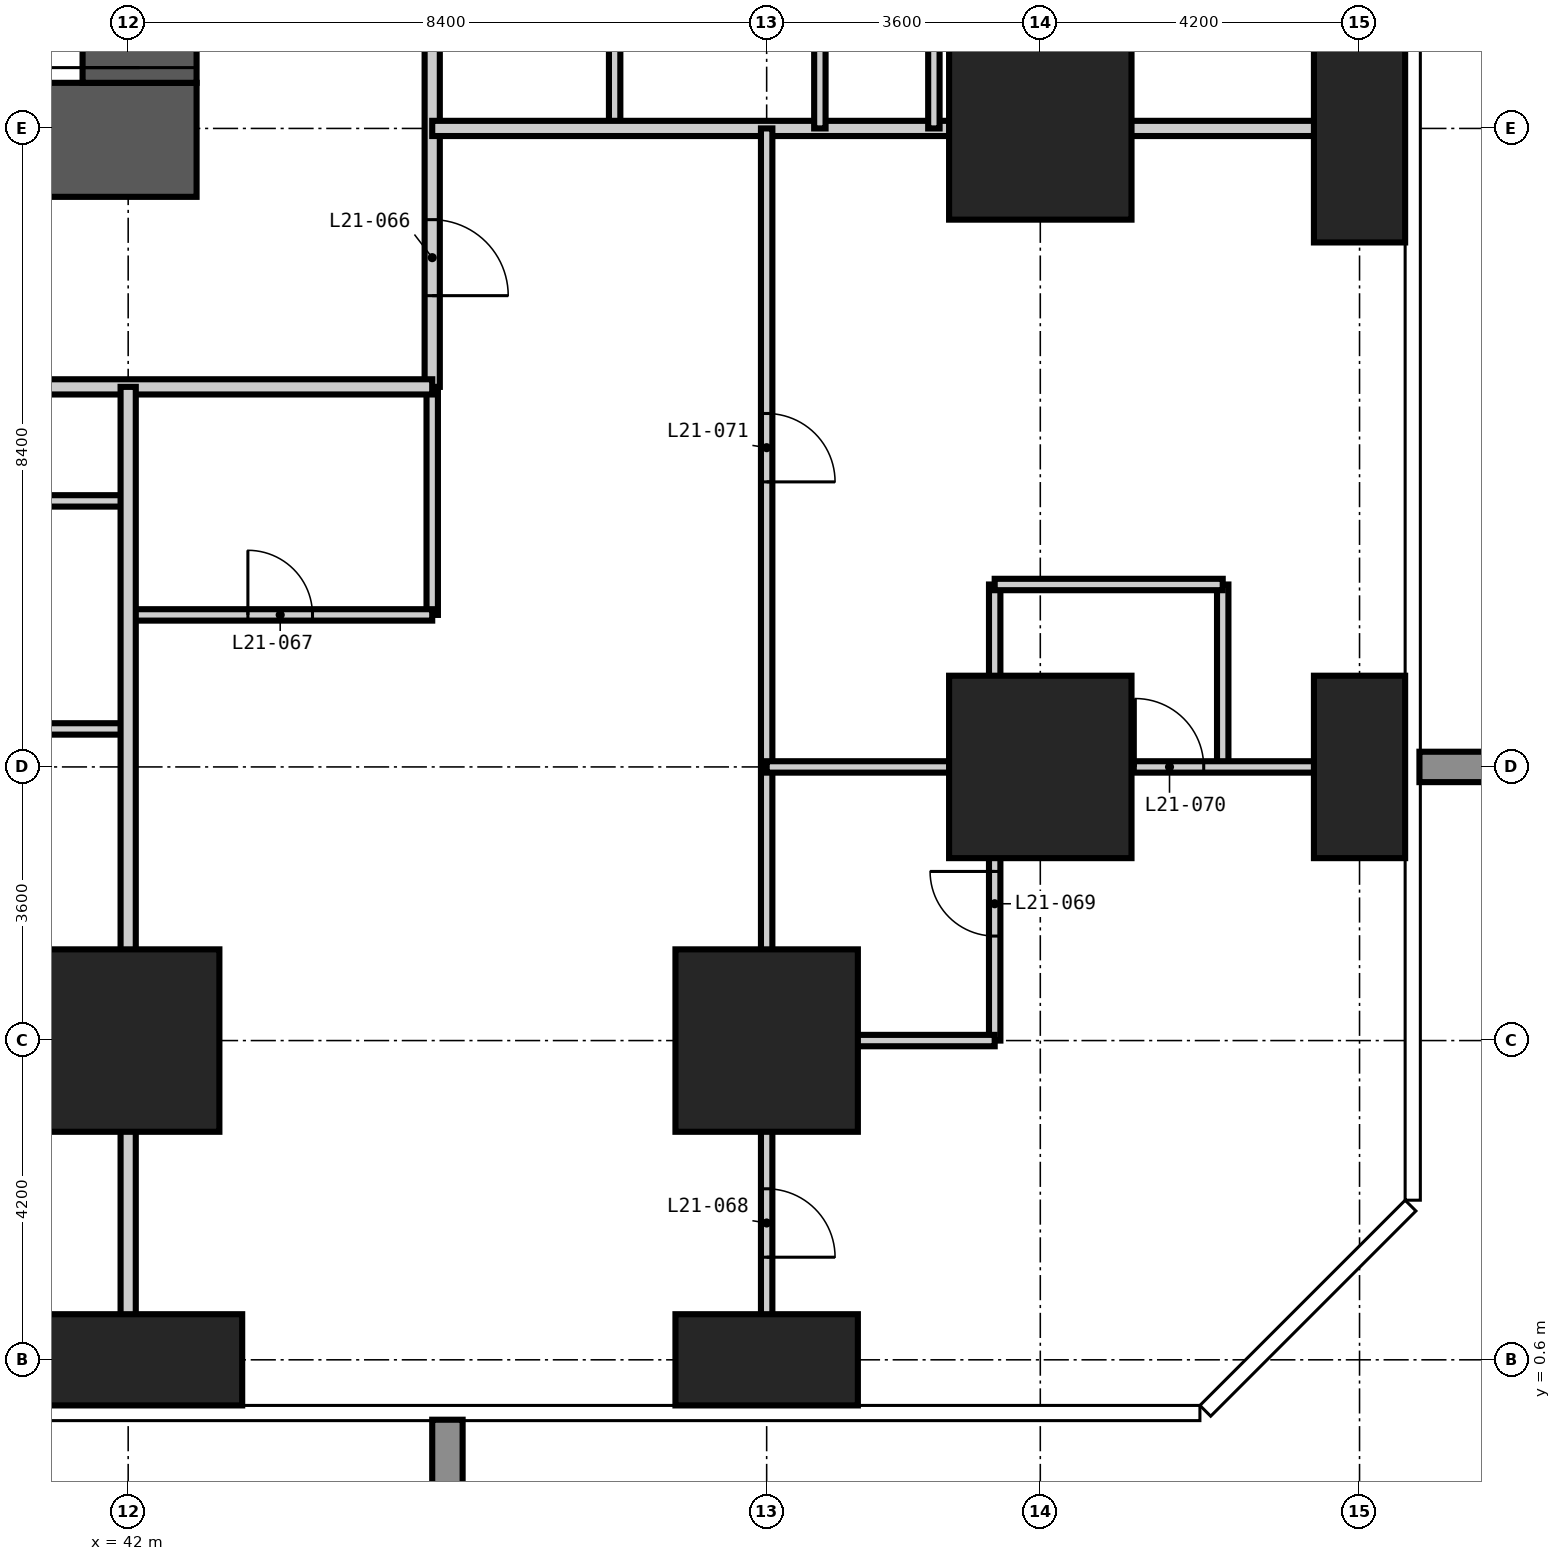
"""IFC4 building model, lengths in metres.
Left out: names, types, materials, properties, quantities, classifications, styles, units other than length and angle.
Written with IfcOpenShell. Run it as: python <this file> out.ifc"""

import sys

from ifc_helpers import new_model, si_unit, direction, frame, frame_2d, origin, origin_2d, place, context, subcontext, project, spatial, rectangle, extrude, element, fill, save


model = new_model("IFC4")
c1 = context("Model", 3, precision=1e-05, world=origin(), true_north=direction((0.0, 1.0)))
c2 = subcontext(c1, "Body", "Model", "MODEL_VIEW")
j1 = project(units=[si_unit("LENGTHUNIT", "METRE"), si_unit("PLANEANGLEUNIT", "RADIAN")], contexts=[c1])
p1 = place(None, origin())
s1 = spatial("IfcSite", under=j1, at=p1, CompositionType="ELEMENT")
p2 = place(p1, origin())
s2 = spatial("IfcBuilding", under=s1, at=p2, CompositionType="ELEMENT")
p3 = place(p2, frame((0.0, 0.0, 84.6)))
s3 = spatial("IfcBuildingStorey", under=s2, at=p3, CompositionType="ELEMENT", Elevation=84.6)
p4 = place(p3, frame((42.0, 0.6, -0.35), z_axis=(0.0, 0.0, 1.0), x_axis=(1.0, 0.0, 0.0)))
e1 = element("IfcColumn", 1, at=p4, inside=s3, PredefinedType="COLUMN", context=c2, shape_type="SweptSolid", body=[
    extrude(rectangle(XDim=3.0, YDim=1.2, at=origin_2d()), origin(), (0.0, 0.0, 1.0), 3.55),
])
p5 = place(p3, frame((42.0, 4.8, -0.35), z_axis=(0.0, 0.0, 1.0), x_axis=(1.0, 0.0, 0.0)))
e2 = element("IfcColumn", 2, at=p5, inside=s3, PredefinedType="COLUMN", context=c2, shape_type="SweptSolid", body=[
    extrude(rectangle(XDim=2.4, YDim=2.4, at=origin_2d()), origin(), (0.0, 0.0, 1.0), 3.55),
])
p6 = place(p3, frame((50.4, 0.6, -0.35), z_axis=(0.0, 0.0, 1.0), x_axis=(1.0, 0.0, 0.0)))
e3 = element("IfcColumn", 3, at=p6, inside=s3, PredefinedType="COLUMN", context=c2, shape_type="SweptSolid", body=[
    extrude(rectangle(XDim=2.4, YDim=1.2, at=origin_2d()), origin(), (0.0, 0.0, 1.0), 3.55),
])
for number, where, z_axis, x_axis in (
    (4, (50.4, 4.8, -0.35), (0.0, 0.0, 1.0), (1.0, 0.0, 0.0)),
    (5, (54.0, 8.4, -0.35), (0.0, 0.0, 1.0), (1.0, 0.0, 0.0)),
    (6, (54.0, 16.8, -0.35), (0.0, 0.0, 1.0), (1.0, 0.0, 0.0)),
):
    element("IfcColumn", number, at=place(p3, frame(where, z_axis=z_axis, x_axis=x_axis)), inside=s3, PredefinedType="COLUMN", context=c2, shape_type="SweptSolid", body=[
        extrude(rectangle(XDim=2.4, YDim=2.4, at=origin_2d()), origin(), (0.0, 0.0, 1.0), 3.55),
    ])
p7 = place(p3, frame((58.2, 8.4, -0.35), z_axis=(0.0, 0.0, 1.0), x_axis=(1.0, 0.0, 0.0)))
e7 = element("IfcColumn", 7, at=p7, inside=s3, PredefinedType="COLUMN", context=c2, shape_type="SweptSolid", body=[
    extrude(rectangle(XDim=1.2, YDim=2.4, at=origin_2d()), origin(), (0.0, 0.0, 1.0), 3.55),
])
p8 = place(p3, frame((58.2, 16.8, -0.35), z_axis=(0.0, 0.0, 1.0), x_axis=(1.0, 0.0, 0.0)))
e8 = element("IfcColumn", 8, at=p8, inside=s3, PredefinedType="COLUMN", context=c2, shape_type="SweptSolid", body=[
    extrude(rectangle(XDim=1.2, YDim=3.0, at=origin_2d()), origin(), (0.0, 0.0, 1.0), 3.55),
])
p9 = place(p3, frame((15.9, 16.65, -0.35), z_axis=(0.0, 0.0, 1.0), x_axis=(1.0, 0.0, 0.0)))
e9 = element("IfcWall", 9, at=p9, inside=s3, PredefinedType="SHEAR", context=c2, shape_type="SweptSolid", body=[
    extrude(rectangle(XDim=27.0, YDim=1.5, at=frame_2d((13.5, 0.0))), origin(), (0.0, 0.0, 1.0), 3.55),
])
p10 = place(p9, frame((13.0, 0.0, 0.35)))
e10 = element("IfcOpeningElement", 10, at=p10, cuts=e9, PredefinedType="OPENING", context=c2, shape_type="SweptSolid", body=[
    extrude(rectangle(XDim=1.0, YDim=2.1, at=frame_2d((0.5, 1.05))), frame((0.0, 0.76, 0.0), z_axis=(0.0, -1.0, 0.0), x_axis=(1.0, 0.0, 0.0)), (0.0, 0.0, 1.0), 1.52),
])
p11 = place(p9, frame((19.3, 0.0, 0.35)))
e11 = element("IfcOpeningElement", 11, at=p11, cuts=e9, PredefinedType="OPENING", context=c2, shape_type="SweptSolid", body=[
    extrude(rectangle(XDim=1.0, YDim=2.1, at=frame_2d((0.5, 1.05))), frame((0.0, 0.76, 0.0), z_axis=(0.0, -1.0, 0.0), x_axis=(1.0, 0.0, 0.0)), (0.0, 0.0, 1.0), 1.52),
])
p12 = place(p3, frame((42.15, 17.4, -0.35), z_axis=(0.0, 0.0, 1.0), x_axis=(0.0, 1.0, 0.0)))
e12 = element("IfcWall", 12, at=p12, inside=s3, PredefinedType="SHEAR", context=c2, shape_type="SweptSolid", body=[
    extrude(rectangle(XDim=24.0, YDim=1.5, at=frame_2d((12.0, 0.0))), origin(), (0.0, 0.0, 1.0), 3.55),
])
p13 = place(p12, frame((0.2, 0.0, 0.35)))
e13 = element("IfcOpeningElement", 13, at=p13, cuts=e12, PredefinedType="OPENING", context=c2, shape_type="SweptSolid", body=[
    extrude(rectangle(XDim=1.2, YDim=2.2, at=frame_2d((0.6, 1.1))), frame((0.0, 0.76, 0.0), z_axis=(0.0, -1.0, 0.0), x_axis=(1.0, 0.0, 0.0)), (0.0, 0.0, 1.0), 1.52),
])
p14 = place(p12, frame((11.5, 0.0, 0.35)))
e14 = element("IfcOpeningElement", 14, at=p14, cuts=e12, PredefinedType="OPENING", context=c2, shape_type="SweptSolid", body=[
    extrude(rectangle(XDim=1.0, YDim=2.1, at=frame_2d((0.5, 1.05))), frame((0.0, 0.76, 0.0), z_axis=(0.0, -1.0, 0.0), x_axis=(1.0, 0.0, 0.0)), (0.0, 0.0, 1.0), 1.52),
])
p15 = place(p12, frame((19.9, 0.0, 0.35)))
e15 = element("IfcOpeningElement", 15, at=p15, cuts=e12, PredefinedType="OPENING", context=c2, shape_type="SweptSolid", body=[
    extrude(rectangle(XDim=1.0, YDim=2.1, at=frame_2d((0.5, 1.05))), frame((0.0, 0.76, 0.0), z_axis=(0.0, -1.0, 0.0), x_axis=(1.0, 0.0, 0.0)), (0.0, 0.0, 1.0), 1.52),
])
p16 = place(p3, frame((46.0, 10.4, 0.0), z_axis=(0.0, 0.0, 1.0), x_axis=(0.0, 1.0, 0.0)))
e16 = element("IfcWall", 16, at=p16, inside=s3, PredefinedType="PARTITIONING", context=c2, shape_type="SweptSolid", body=[
    extrude(rectangle(XDim=3.0, YDim=0.15, at=frame_2d((1.5, 0.0))), origin(), (0.0, 0.0, 1.0), 3.2),
])
p17 = place(p3, frame((48.4, 16.8, 0.0), z_axis=(0.0, 0.0, 1.0), x_axis=(0.0, 1.0, 0.0)))
e17 = element("IfcWall", 17, at=p17, inside=s3, PredefinedType="PARTITIONING", context=c2, shape_type="SweptSolid", body=[
    extrude(rectangle(XDim=2.7, YDim=0.15, at=frame_2d((1.35, 0.0))), origin(), (0.0, 0.0, 1.0), 3.2),
])
p18 = place(p3, frame((53.4, 4.8, 0.0), z_axis=(0.0, 0.0, 1.0), x_axis=(0.0, 1.0, 0.0)))
e18 = element("IfcWall", 18, at=p18, inside=s3, PredefinedType="PARTITIONING", context=c2, shape_type="SweptSolid", body=[
    extrude(rectangle(XDim=3.6, YDim=0.15, at=frame_2d((1.8, 0.0))), origin(), (0.0, 0.0, 1.0), 3.2),
])
p19 = place(p18, frame((1.375, 0.0, 0.0)))
e19 = element("IfcOpeningElement", 19, at=p19, cuts=e18, PredefinedType="OPENING", context=c2, shape_type="SweptSolid", body=[
    extrude(rectangle(XDim=0.85, YDim=2.1, at=frame_2d((0.425, 1.05))), frame((0.0, 0.085, 0.0), z_axis=(0.0, -1.0, 0.0), x_axis=(1.0, 0.0, 0.0)), (0.0, 0.0, 1.0), 0.17),
])
p20 = place(p3, frame((50.4, 4.8, 0.0), z_axis=(0.0, 0.0, 1.0), x_axis=(1.0, 0.0, 0.0)))
e20 = element("IfcWall", 20, at=p20, inside=s3, PredefinedType="PARTITIONING", context=c2, shape_type="SweptSolid", body=[
    extrude(rectangle(XDim=3.0, YDim=0.15, at=frame_2d((1.5, 0.0))), origin(), (0.0, 0.0, 1.0), 3.2),
])
p21 = place(p3, frame((39.3, 8.9, 0.0), z_axis=(0.0, 0.0, 1.0), x_axis=(1.0, 0.0, 0.0)))
e21 = element("IfcWall", 21, at=p21, inside=s3, PredefinedType="PARTITIONING", context=c2, shape_type="SweptSolid", body=[
    extrude(rectangle(XDim=2.7, YDim=0.15, at=frame_2d((1.35, 0.0))), origin(), (0.0, 0.0, 1.0), 3.2),
])
p22 = place(p3, frame((42.0, 10.4, 0.0), z_axis=(0.0, 0.0, 1.0), x_axis=(1.0, 0.0, 0.0)))
e22 = element("IfcWall", 22, at=p22, inside=s3, PredefinedType="PARTITIONING", context=c2, shape_type="SweptSolid", body=[
    extrude(rectangle(XDim=4.0, YDim=0.15, at=frame_2d((2.0, 0.0))), origin(), (0.0, 0.0, 1.0), 3.2),
])
p23 = place(p22, frame((1.575, 0.0, 0.0)))
e23 = element("IfcOpeningElement", 23, at=p23, cuts=e22, PredefinedType="OPENING", context=c2, shape_type="SweptSolid", body=[
    extrude(rectangle(XDim=0.85, YDim=2.1, at=frame_2d((0.425, 1.05))), frame((0.0, 0.085, 0.0), z_axis=(0.0, -1.0, 0.0), x_axis=(1.0, 0.0, 0.0)), (0.0, 0.0, 1.0), 0.17),
])
p24 = place(p3, frame((39.3, 11.9, 0.0), z_axis=(0.0, 0.0, 1.0), x_axis=(1.0, 0.0, 0.0)))
e24 = element("IfcWall", 24, at=p24, inside=s3, PredefinedType="PARTITIONING", context=c2, shape_type="SweptSolid", body=[
    extrude(rectangle(XDim=2.7, YDim=0.15, at=frame_2d((1.35, 0.0))), origin(), (0.0, 0.0, 1.0), 3.2),
])
p25 = place(p3, frame((46.0, 44.8, 0.0), z_axis=(0.0, 0.0, 1.0), x_axis=(0.0, -1.0, 0.0)))
e25 = element("IfcWall", 25, at=p25, inside=s3, PredefinedType="PARTITIONING", context=c2, shape_type="SweptSolid", body=[
    extrude(rectangle(XDim=31.4, YDim=0.2, at=frame_2d((15.7, 0.0))), origin(), (0.0, 0.0, 1.0), 3.2),
])
p26 = place(p25, frame((21.2, 0.0, 0.0)))
e26 = element("IfcOpeningElement", 26, at=p26, cuts=e25, PredefinedType="OPENING", context=c2, shape_type="SweptSolid", body=[
    extrude(rectangle(XDim=1.0, YDim=2.2, at=frame_2d((0.5, 1.1))), frame((0.0, 0.11, 0.0), z_axis=(0.0, -1.0, 0.0), x_axis=(1.0, 0.0, 0.0)), (0.0, 0.0, 1.0), 0.22),
])
p27 = place(p25, frame((8.6, 0.0, 0.0)))
e27 = element("IfcOpeningElement", 27, at=p27, cuts=e25, PredefinedType="OPENING", context=c2, shape_type="SweptSolid", body=[
    extrude(rectangle(XDim=1.0, YDim=2.2, at=frame_2d((0.5, 1.1))), frame((0.0, 0.11, 0.0), z_axis=(0.0, -1.0, 0.0), x_axis=(1.0, 0.0, 0.0)), (0.0, 0.0, 1.0), 0.22),
])
p28 = place(p25, frame((29.2, 0.0, 0.0)))
e28 = element("IfcOpeningElement", 28, at=p28, cuts=e25, PredefinedType="OPENING", context=c2, shape_type="SweptSolid", body=[
    extrude(rectangle(XDim=1.0, YDim=2.2, at=frame_2d((0.5, 1.1))), frame((0.0, 0.11, 0.0), z_axis=(0.0, -1.0, 0.0), x_axis=(1.0, 0.0, 0.0)), (0.0, 0.0, 1.0), 0.22),
])
p29 = place(p25, frame((0.9, 0.0, 0.0)))
e29 = element("IfcOpeningElement", 29, at=p29, cuts=e25, PredefinedType="OPENING", context=c2, shape_type="SweptSolid", body=[
    extrude(rectangle(XDim=1.0, YDim=2.2, at=frame_2d((0.5, 1.1))), frame((0.0, 0.11, 0.0), z_axis=(0.0, -1.0, 0.0), x_axis=(1.0, 0.0, 0.0)), (0.0, 0.0, 1.0), 0.22),
])
p30 = place(p3, frame((46.0, 13.4, 0.0), z_axis=(0.0, 0.0, 1.0), x_axis=(-1.0, 0.0, 0.0)))
e30 = element("IfcWall", 30, at=p30, inside=s3, PredefinedType="PARTITIONING", context=c2, shape_type="SweptSolid", body=[
    extrude(rectangle(XDim=32.6, YDim=0.2, at=frame_2d((16.3, 0.0))), origin(), (0.0, 0.0, 1.0), 3.2),
])
p31 = place(p30, frame((26.6, 0.0, 0.0)))
e31 = element("IfcOpeningElement", 31, at=p31, cuts=e30, PredefinedType="OPENING", context=c2, shape_type="SweptSolid", body=[
    extrude(rectangle(XDim=1.0, YDim=2.2, at=frame_2d((0.5, 1.1))), frame((0.0, 0.11, 0.0), z_axis=(0.0, -1.0, 0.0), x_axis=(1.0, 0.0, 0.0)), (0.0, 0.0, 1.0), 0.22),
])
p32 = place(p30, frame((19.1, 0.0, 0.0)))
e32 = element("IfcOpeningElement", 32, at=p32, cuts=e30, PredefinedType="OPENING", context=c2, shape_type="SweptSolid", body=[
    extrude(rectangle(XDim=1.0, YDim=2.2, at=frame_2d((0.5, 1.1))), frame((0.0, 0.11, 0.0), z_axis=(0.0, -1.0, 0.0), x_axis=(1.0, 0.0, 0.0)), (0.0, 0.0, 1.0), 0.22),
])
p33 = place(p30, frame((13.1, 0.0, 0.0)))
e33 = element("IfcOpeningElement", 33, at=p33, cuts=e30, PredefinedType="OPENING", context=c2, shape_type="SweptSolid", body=[
    extrude(rectangle(XDim=1.0, YDim=2.2, at=frame_2d((0.5, 1.1))), frame((0.0, 0.11, 0.0), z_axis=(0.0, -1.0, 0.0), x_axis=(1.0, 0.0, 0.0)), (0.0, 0.0, 1.0), 0.22),
])
p34 = place(p30, frame((5.6, 0.0, 0.0)))
e34 = element("IfcOpeningElement", 34, at=p34, cuts=e30, PredefinedType="OPENING", context=c2, shape_type="SweptSolid", body=[
    extrude(rectangle(XDim=1.0, YDim=2.2, at=frame_2d((0.5, 1.1))), frame((0.0, 0.11, 0.0), z_axis=(0.0, -1.0, 0.0), x_axis=(1.0, 0.0, 0.0)), (0.0, 0.0, 1.0), 0.22),
])
p35 = place(p3, frame((42.0, -0.008, 0.0), z_axis=(0.0, 0.0, 1.0), x_axis=(0.0, 1.0, 0.0)))
e35 = element("IfcWall", 35, at=p35, inside=s3, PredefinedType="PARTITIONING", context=c2, shape_type="SweptSolid", body=[
    extrude(rectangle(XDim=13.408, YDim=0.2, at=frame_2d((6.704, 0.0))), origin(), (0.0, 0.0, 1.0), 3.2),
])
p36 = place(p3, frame((46.0, 16.8, 0.0), z_axis=(0.0, 0.0, 1.0), x_axis=(1.0, 0.0, 0.0)))
e36 = element("IfcWall", 36, at=p36, inside=s3, PredefinedType="PARTITIONING", context=c2, shape_type="SweptSolid", body=[
    extrude(rectangle(XDim=12.808, YDim=0.2, at=frame_2d((6.404, 0.0))), origin(), (0.0, 0.0, 1.0), 3.2),
])
p37 = place(p3, frame((50.4, -0.008, 0.0), z_axis=(0.0, 0.0, 1.0), x_axis=(0.0, 1.0, 0.0)))
e37 = element("IfcWall", 37, at=p37, inside=s3, PredefinedType="PARTITIONING", context=c2, shape_type="SweptSolid", body=[
    extrude(rectangle(XDim=16.808, YDim=0.15, at=frame_2d((8.404, 0.0))), origin(), (0.0, 0.0, 1.0), 3.2),
])
p38 = place(p37, frame((1.958, 0.0, 0.0)))
e38 = element("IfcOpeningElement", 38, at=p38, cuts=e37, PredefinedType="OPENING", context=c2, shape_type="SweptSolid", body=[
    extrude(rectangle(XDim=0.9, YDim=2.1, at=frame_2d((0.45, 1.05))), frame((0.0, 0.085, 0.0), z_axis=(0.0, -1.0, 0.0), x_axis=(1.0, 0.0, 0.0)), (0.0, 0.0, 1.0), 0.17),
])
p39 = place(p37, frame((12.158, 0.0, 0.0)))
e39 = element("IfcOpeningElement", 39, at=p39, cuts=e37, PredefinedType="OPENING", context=c2, shape_type="SweptSolid", body=[
    extrude(rectangle(XDim=0.9, YDim=2.1, at=frame_2d((0.45, 1.05))), frame((0.0, 0.085, 0.0), z_axis=(0.0, -1.0, 0.0), x_axis=(1.0, 0.0, 0.0)), (0.0, 0.0, 1.0), 0.17),
])
p40 = place(p3, frame((51.1, 16.8, 0.0), z_axis=(0.0, 0.0, 1.0), x_axis=(0.0, 1.0, 0.0)))
e40 = element("IfcWall", 40, at=p40, inside=s3, PredefinedType="PARTITIONING", context=c2, shape_type="SweptSolid", body=[
    extrude(rectangle(XDim=2.7, YDim=0.15, at=frame_2d((1.35, 0.0))), origin(), (0.0, 0.0, 1.0), 3.2),
])
p41 = place(p3, frame((52.6, 16.8, 0.0), z_axis=(0.0, 0.0, 1.0), x_axis=(0.0, 1.0, 0.0)))
e41 = element("IfcWall", 41, at=p41, inside=s3, PredefinedType="PARTITIONING", context=c2, shape_type="SweptSolid", body=[
    extrude(rectangle(XDim=2.7, YDim=0.15, at=frame_2d((1.35, 0.0))), origin(), (0.0, 0.0, 1.0), 3.2),
])
p42 = place(p41, frame((1.3, 0.0, 0.0)))
e42 = element("IfcOpeningElement", 42, at=p42, cuts=e41, PredefinedType="OPENING", context=c2, shape_type="SweptSolid", body=[
    extrude(rectangle(XDim=0.9, YDim=2.1, at=frame_2d((0.45, 1.05))), frame((0.0, 0.085, 0.0), z_axis=(0.0, -1.0, 0.0), x_axis=(1.0, 0.0, 0.0)), (0.0, 0.0, 1.0), 0.17),
])
for number, where, z_axis, x_axis in (
    (43, (53.4, 8.4, 0.0), (0.0, 0.0, 1.0), (0.0, 1.0, 0.0)),
    (44, (56.4, 8.4, 0.0), (0.0, 0.0, 1.0), (0.0, 1.0, 0.0)),
):
    element("IfcWall", number, at=place(p3, frame(where, z_axis=z_axis, x_axis=x_axis)), inside=s3, PredefinedType="PARTITIONING", context=c2, shape_type="SweptSolid", body=[
        extrude(rectangle(XDim=2.4, YDim=0.15, at=frame_2d((1.2, 0.0))), origin(), (0.0, 0.0, 1.0), 3.2),
    ])
p43 = place(p3, frame((50.4, 8.4, 0.0), z_axis=(0.0, 0.0, 1.0), x_axis=(1.0, 0.0, 0.0)))
e45 = element("IfcWall", 45, at=p43, inside=s3, PredefinedType="PARTITIONING", context=c2, shape_type="SweptSolid", body=[
    extrude(rectangle(XDim=8.408, YDim=0.15, at=frame_2d((4.204, 0.0))), origin(), (0.0, 0.0, 1.0), 3.2),
])
p44 = place(p43, frame((4.85, 0.0, 0.0)))
e46 = element("IfcOpeningElement", 46, at=p44, cuts=e45, PredefinedType="OPENING", context=c2, shape_type="SweptSolid", body=[
    extrude(rectangle(XDim=0.9, YDim=2.1, at=frame_2d((0.45, 1.05))), frame((0.0, 0.085, 0.0), z_axis=(0.0, -1.0, 0.0), x_axis=(1.0, 0.0, 0.0)), (0.0, 0.0, 1.0), 0.17),
])
p45 = place(p3, frame((53.4, 10.8, 0.0), z_axis=(0.0, 0.0, 1.0), x_axis=(1.0, 0.0, 0.0)))
e47 = element("IfcWall", 47, at=p45, inside=s3, PredefinedType="PARTITIONING", context=c2, shape_type="SweptSolid", body=[
    extrude(rectangle(XDim=3.0, YDim=0.15, at=frame_2d((1.5, 0.0))), origin(), (0.0, 0.0, 1.0), 3.2),
])
p46 = place(p13, origin())
e48 = element("IfcDoor", 48, at=p46, inside=s3, OperationType="SINGLE_SWING_LEFT", PredefinedType="DOOR", context=c2, shape_type="SweptSolid", body=[
    extrude(rectangle(XDim=1.2, YDim=2.2, at=frame_2d((0.6, 1.1))), frame((0.0, 0.025, 0.0), z_axis=(0.0, -1.0, 0.0), x_axis=(1.0, 0.0, 0.0)), (0.0, 0.0, 1.0), 0.05),
])
fill(e13, e48)
p47 = place(p28, origin())
e49 = element("IfcDoor", 49, at=p47, inside=s3, OperationType="SINGLE_SWING_RIGHT", PredefinedType="DOOR", context=c2, shape_type="SweptSolid", body=[
    extrude(rectangle(XDim=1.0, YDim=2.2, at=frame_2d((0.5, 1.1))), frame((0.0, 0.025, 0.0), z_axis=(0.0, -1.0, 0.0), x_axis=(1.0, 0.0, 0.0)), (0.0, 0.0, 1.0), 0.05),
])
fill(e28, e49)
p48 = place(p23, origin())
e50 = element("IfcDoor", 50, at=p48, inside=s3, OperationType="SINGLE_SWING_LEFT", PredefinedType="DOOR", context=c2, shape_type="SweptSolid", body=[
    extrude(rectangle(XDim=0.85, YDim=2.1, at=frame_2d((0.425, 1.05))), frame((0.0, 0.025, 0.0), z_axis=(0.0, -1.0, 0.0), x_axis=(1.0, 0.0, 0.0)), (0.0, 0.0, 1.0), 0.05),
])
fill(e23, e50)
p49 = place(p38, frame((0.9, 0.0, 0.0), z_axis=(0.0, 0.0, 1.0), x_axis=(-1.0, 0.0, 0.0)))
e51 = element("IfcDoor", 51, at=p49, inside=s3, OperationType="SINGLE_SWING_RIGHT", PredefinedType="DOOR", context=c2, shape_type="SweptSolid", body=[
    extrude(rectangle(XDim=0.9, YDim=2.1, at=frame_2d((0.45, 1.05))), frame((0.0, 0.025, 0.0), z_axis=(0.0, -1.0, 0.0), x_axis=(1.0, 0.0, 0.0)), (0.0, 0.0, 1.0), 0.05),
])
fill(e38, e51)
p50 = place(p19, origin())
e52 = element("IfcDoor", 52, at=p50, inside=s3, OperationType="SINGLE_SWING_RIGHT", PredefinedType="DOOR", context=c2, shape_type="SweptSolid", body=[
    extrude(rectangle(XDim=0.85, YDim=2.1, at=frame_2d((0.425, 1.05))), frame((0.0, 0.025, 0.0), z_axis=(0.0, -1.0, 0.0), x_axis=(1.0, 0.0, 0.0)), (0.0, 0.0, 1.0), 0.05),
])
fill(e19, e52)
p51 = place(p44, origin())
e53 = element("IfcDoor", 53, at=p51, inside=s3, OperationType="SINGLE_SWING_LEFT", PredefinedType="DOOR", context=c2, shape_type="SweptSolid", body=[
    extrude(rectangle(XDim=0.9, YDim=2.1, at=frame_2d((0.45, 1.05))), frame((0.0, 0.025, 0.0), z_axis=(0.0, -1.0, 0.0), x_axis=(1.0, 0.0, 0.0)), (0.0, 0.0, 1.0), 0.05),
])
fill(e46, e53)
p52 = place(p39, frame((0.9, 0.0, 0.0), z_axis=(0.0, 0.0, 1.0), x_axis=(-1.0, 0.0, 0.0)))
e54 = element("IfcDoor", 54, at=p52, inside=s3, OperationType="SINGLE_SWING_RIGHT", PredefinedType="DOOR", context=c2, shape_type="SweptSolid", body=[
    extrude(rectangle(XDim=0.9, YDim=2.1, at=frame_2d((0.45, 1.05))), frame((0.0, 0.025, 0.0), z_axis=(0.0, -1.0, 0.0), x_axis=(1.0, 0.0, 0.0)), (0.0, 0.0, 1.0), 0.05),
])
fill(e39, e54)
save(model, sys.argv[1])
